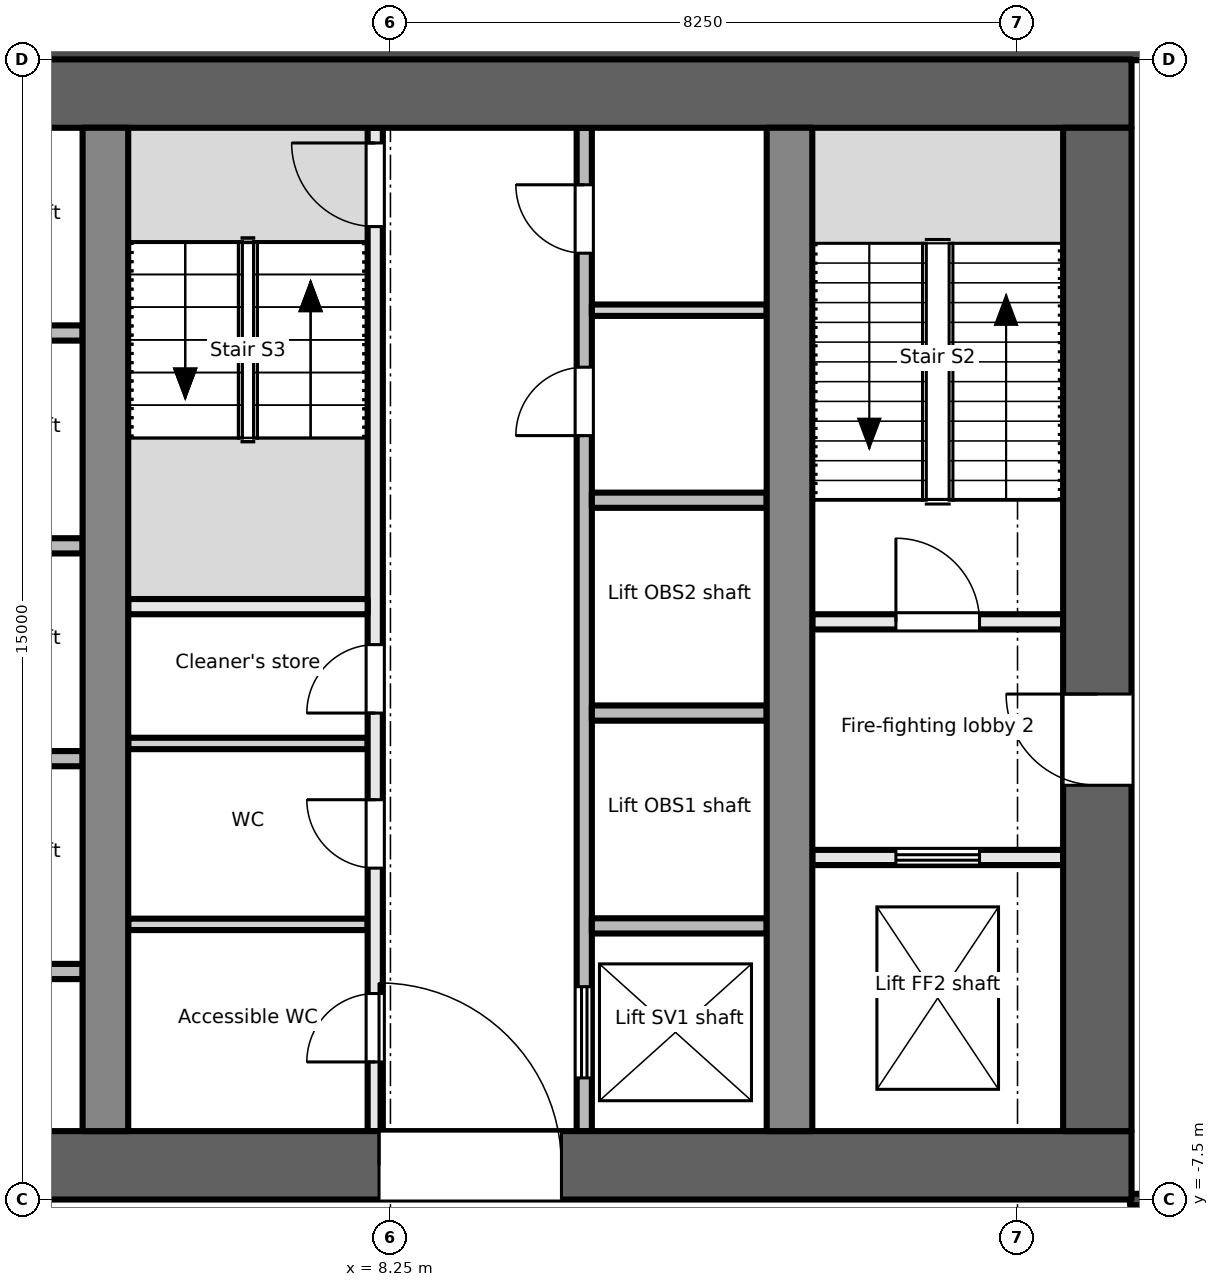
"""IFC4 building model, lengths in metres.
Left out: names, types, materials, properties, quantities, classifications, styles, units other than length and angle.
Written with IfcOpenShell. Run it as: python <this file> out.ifc"""

import sys

from ifc_helpers import new_model, si_unit, direction, frame, frame_2d, origin, place, context, subcontext, project, spatial, rectangle, extrude, element, fill, save


model = new_model("IFC4")
c1 = context("Model", 3, precision=1e-05, world=origin(), true_north=direction((0.0, 1.0)))
c2 = subcontext(c1, "Body", "Model", "MODEL_VIEW")
j1 = project(units=[si_unit("LENGTHUNIT", "METRE"), si_unit("PLANEANGLEUNIT", "RADIAN")], contexts=[c1])
p1 = place(None, origin())
s1 = spatial("IfcSite", under=j1, at=p1, CompositionType="ELEMENT")
p2 = place(p1, origin())
s2 = spatial("IfcBuilding", under=s1, at=p2, CompositionType="ELEMENT")
p3 = place(p2, frame((0.0, 0.0, 69.3)))
s3 = spatial("IfcBuildingStorey", under=s2, at=p3, CompositionType="ELEMENT", Elevation=69.3)
p4 = place(p3, frame((-18.0, -7.05, -0.2), z_axis=(0.0, 0.0, 1.0), x_axis=(1.0, 0.0, 0.0)))
e1 = element("IfcWall", 1, at=p4, inside=s3, PredefinedType="SHEAR", context=c2, shape_type="SweptSolid", body=[
    extrude(rectangle(XDim=36.0, YDim=0.9, at=frame_2d((18.0, 0.0))), origin(), (0.0, 0.0, 1.0), 5.0),
])
p5 = place(p4, frame((7.8, 0.0, 0.2)))
e2 = element("IfcOpeningElement", 2, at=p5, cuts=e1, PredefinedType="OPENING", context=c2, shape_type="SweptSolid", body=[
    extrude(rectangle(XDim=2.4, YDim=2.1, at=frame_2d((1.2, 1.05))), frame((0.0, 0.46, 0.0), z_axis=(0.0, -1.0, 0.0), x_axis=(1.0, 0.0, 0.0)), (0.0, 0.0, 1.0), 0.921),
])
p6 = place(p4, frame((17.4, 0.0, 0.2)))
e3 = element("IfcOpeningElement", 3, at=p6, cuts=e1, PredefinedType="OPENING", context=c2, shape_type="SweptSolid", body=[
    extrude(rectangle(XDim=1.2, YDim=2.1, at=frame_2d((0.6, 1.05))), frame((0.0, 0.46, 0.0), z_axis=(0.0, -1.0, 0.0), x_axis=(1.0, 0.0, 0.0)), (0.0, 0.0, 1.0), 0.921),
])
p7 = place(p4, frame((26.1, 0.0, 0.2)))
e4 = element("IfcOpeningElement", 4, at=p7, cuts=e1, PredefinedType="OPENING", context=c2, shape_type="SweptSolid", body=[
    extrude(rectangle(XDim=2.4, YDim=2.1, at=frame_2d((1.2, 1.05))), frame((0.0, 0.46, 0.0), z_axis=(0.0, -1.0, 0.0), x_axis=(1.0, 0.0, 0.0)), (0.0, 0.0, 1.0), 0.921),
])
p8 = place(p3, frame((-18.0, 7.05, -0.2), z_axis=(0.0, 0.0, 1.0), x_axis=(1.0, 0.0, 0.0)))
e5 = element("IfcWall", 5, at=p8, inside=s3, PredefinedType="SHEAR", context=c2, shape_type="SweptSolid", body=[
    extrude(rectangle(XDim=36.0, YDim=0.9, at=frame_2d((18.0, 0.0))), origin(), (0.0, 0.0, 1.0), 5.0),
])
p9 = place(p3, frame((17.55, -6.6, -0.2), z_axis=(0.0, 0.0, 1.0), x_axis=(0.0, 1.0, 0.0)))
e6 = element("IfcWall", 6, at=p9, inside=s3, PredefinedType="SHEAR", context=c2, shape_type="SweptSolid", body=[
    extrude(rectangle(XDim=13.2, YDim=0.9, at=frame_2d((6.6, 0.0))), origin(), (0.0, 0.0, 1.0), 5.0),
])
p10 = place(p9, frame((4.55, 0.0, 0.2)))
e7 = element("IfcOpeningElement", 7, at=p10, cuts=e6, PredefinedType="OPENING", context=c2, shape_type="SweptSolid", body=[
    extrude(rectangle(XDim=1.2, YDim=2.1, at=frame_2d((0.6, 1.05))), frame((0.0, 0.46, 0.0), z_axis=(0.0, -1.0, 0.0), x_axis=(1.0, 0.0, 0.0)), (0.0, 0.0, 1.0), 0.921),
])
for number, where, z_axis, x_axis in (
    (8, (4.5, -6.6, -0.2), (0.0, 0.0, 1.0), (0.0, 1.0, 0.0)),
    (9, (13.5, -6.6, -0.2), (0.0, 0.0, 1.0), (0.0, 1.0, 0.0)),
):
    element("IfcWall", number, at=place(p3, frame(where, z_axis=z_axis, x_axis=x_axis)), inside=s3, PredefinedType="SHEAR", context=c2, shape_type="SweptSolid", body=[
        extrude(rectangle(XDim=13.2, YDim=0.6, at=frame_2d((6.6, 0.0))), origin(), (0.0, 0.0, 1.0), 5.0),
    ])
p11 = place(p3, frame((13.8, -3.0, 0.0), z_axis=(0.0, 0.0, 1.0), x_axis=(1.0, 0.0, 0.0)))
e10 = element("IfcWall", 10, at=p11, inside=s3, PredefinedType="PARTITIONING", context=c2, shape_type="SweptSolid", body=[
    extrude(rectangle(XDim=3.3, YDim=0.2, at=frame_2d((1.65, 0.0))), origin(), (0.0, 0.0, 1.0), 4.8),
])
p12 = place(p11, frame((1.1, 0.0, 0.0)))
e11 = element("IfcOpeningElement", 11, at=p12, cuts=e10, PredefinedType="OPENING", context=c2, shape_type="SweptSolid", body=[
    extrude(rectangle(XDim=1.1, YDim=2.1, at=frame_2d((0.55, 1.05))), frame((0.0, 0.111, 0.0), z_axis=(0.0, -1.0, 0.0), x_axis=(1.0, 0.0, 0.0)), (0.0, 0.0, 1.0), 0.221),
])
p13 = place(p3, frame((13.8, 0.1, 0.0), z_axis=(0.0, 0.0, 1.0), x_axis=(1.0, 0.0, 0.0)))
e12 = element("IfcWall", 12, at=p13, inside=s3, PredefinedType="PARTITIONING", context=c2, shape_type="SweptSolid", body=[
    extrude(rectangle(XDim=3.3, YDim=0.2, at=frame_2d((1.65, 0.0))), origin(), (0.0, 0.0, 1.0), 4.8),
])
p14 = place(p13, frame((1.1, 0.0, 0.0)))
e13 = element("IfcOpeningElement", 13, at=p14, cuts=e12, PredefinedType="OPENING", context=c2, shape_type="SweptSolid", body=[
    extrude(rectangle(XDim=1.1, YDim=2.1, at=frame_2d((0.55, 1.05))), frame((0.0, 0.111, 0.0), z_axis=(0.0, -1.0, 0.0), x_axis=(1.0, 0.0, 0.0)), (0.0, 0.0, 1.0), 0.221),
])
for number, where, z_axis, x_axis in (
    (14, (1.9, -1.7, 0.0), (0.0, 0.0, 1.0), (1.0, 0.0, 0.0)),
    (15, (1.9, 1.1, 0.0), (0.0, 0.0, 1.0), (1.0, 0.0, 0.0)),
    (16, (1.9, 3.9, 0.0), (0.0, 0.0, 1.0), (1.0, 0.0, 0.0)),
    (17, (1.9, -4.5, 0.0), (0.0, 0.0, 1.0), (1.0, 0.0, 0.0)),
):
    element("IfcWall", number, at=place(p3, frame(where, z_axis=z_axis, x_axis=x_axis)), inside=s3, PredefinedType="PARTITIONING", context=c2, shape_type="SweptSolid", body=[
        extrude(rectangle(XDim=2.3, YDim=0.2, at=frame_2d((1.15, 0.0))), origin(), (0.0, 0.0, 1.0), 4.8),
    ])
p15 = place(p3, frame((8.05, -6.6, 0.0), z_axis=(0.0, 0.0, 1.0), x_axis=(0.0, 1.0, 0.0)))
e18 = element("IfcWall", 18, at=p15, inside=s3, PredefinedType="PARTITIONING", context=c2, shape_type="SweptSolid", body=[
    extrude(rectangle(XDim=13.2, YDim=0.2, at=frame_2d((6.6, 0.0))), origin(), (0.0, 0.0, 1.0), 4.8),
])
p16 = place(p15, frame((0.91, 0.0, 0.0)))
e19 = element("IfcOpeningElement", 19, at=p16, cuts=e18, PredefinedType="OPENING", context=c2, shape_type="SweptSolid", body=[
    extrude(rectangle(XDim=0.9, YDim=2.1, at=frame_2d((0.45, 1.05))), frame((0.0, 0.111, 0.0), z_axis=(0.0, -1.0, 0.0), x_axis=(1.0, 0.0, 0.0)), (0.0, 0.0, 1.0), 0.221),
])
p17 = place(p15, frame((3.46, 0.0, 0.0)))
e20 = element("IfcOpeningElement", 20, at=p17, cuts=e18, PredefinedType="OPENING", context=c2, shape_type="SweptSolid", body=[
    extrude(rectangle(XDim=0.9, YDim=2.1, at=frame_2d((0.45, 1.05))), frame((0.0, 0.111, 0.0), z_axis=(0.0, -1.0, 0.0), x_axis=(1.0, 0.0, 0.0)), (0.0, 0.0, 1.0), 0.221),
])
p18 = place(p15, frame((5.5, 0.0, 0.0)))
e21 = element("IfcOpeningElement", 21, at=p18, cuts=e18, PredefinedType="OPENING", context=c2, shape_type="SweptSolid", body=[
    extrude(rectangle(XDim=0.9, YDim=2.1, at=frame_2d((0.45, 1.05))), frame((0.0, 0.111, 0.0), z_axis=(0.0, -1.0, 0.0), x_axis=(1.0, 0.0, 0.0)), (0.0, 0.0, 1.0), 0.221),
])
p19 = place(p15, frame((11.9, 0.0, 0.0)))
e22 = element("IfcOpeningElement", 22, at=p19, cuts=e18, PredefinedType="OPENING", context=c2, shape_type="SweptSolid", body=[
    extrude(rectangle(XDim=1.1, YDim=2.1, at=frame_2d((0.55, 1.05))), frame((0.0, 0.111, 0.0), z_axis=(0.0, -1.0, 0.0), x_axis=(1.0, 0.0, 0.0)), (0.0, 0.0, 1.0), 0.221),
])
p20 = place(p3, frame((10.8, -6.6, 0.0), z_axis=(0.0, 0.0, 1.0), x_axis=(0.0, 1.0, 0.0)))
e23 = element("IfcWall", 23, at=p20, inside=s3, PredefinedType="PARTITIONING", context=c2, shape_type="SweptSolid", body=[
    extrude(rectangle(XDim=13.2, YDim=0.2, at=frame_2d((6.6, 0.0))), origin(), (0.0, 0.0, 1.0), 4.8),
])
p21 = place(p20, frame((0.7, 0.0, 0.0)))
e24 = element("IfcOpeningElement", 24, at=p21, cuts=e23, PredefinedType="OPENING", context=c2, shape_type="SweptSolid", body=[
    extrude(rectangle(XDim=1.2, YDim=2.1, at=frame_2d((0.6, 1.05))), frame((0.0, 0.111, 0.0), z_axis=(0.0, -1.0, 0.0), x_axis=(1.0, 0.0, 0.0)), (0.0, 0.0, 1.0), 0.221),
])
p22 = place(p20, frame((9.15, 0.0, 0.0)))
e25 = element("IfcOpeningElement", 25, at=p22, cuts=e23, PredefinedType="OPENING", context=c2, shape_type="SweptSolid", body=[
    extrude(rectangle(XDim=0.9, YDim=2.1, at=frame_2d((0.45, 1.05))), frame((0.0, 0.111, 0.0), z_axis=(0.0, -1.0, 0.0), x_axis=(1.0, 0.0, 0.0)), (0.0, 0.0, 1.0), 0.221),
])
p23 = place(p20, frame((11.55, 0.0, 0.0)))
e26 = element("IfcOpeningElement", 26, at=p23, cuts=e23, PredefinedType="OPENING", context=c2, shape_type="SweptSolid", body=[
    extrude(rectangle(XDim=0.9, YDim=2.1, at=frame_2d((0.45, 1.05))), frame((0.0, 0.111, 0.0), z_axis=(0.0, -1.0, 0.0), x_axis=(1.0, 0.0, 0.0)), (0.0, 0.0, 1.0), 0.221),
])
p24 = place(p3, frame((4.8, 0.3, 0.0), z_axis=(0.0, 0.0, 1.0), x_axis=(1.0, 0.0, 0.0)))
e27 = element("IfcWall", 27, at=p24, inside=s3, PredefinedType="PARTITIONING", context=c2, shape_type="SweptSolid", body=[
    extrude(rectangle(XDim=3.15, YDim=0.2, at=frame_2d((1.575, 0.0))), origin(), (0.0, 0.0, 1.0), 4.8),
])
for number, where, z_axis, x_axis in (
    (28, (4.8, -3.88, 0.0), (0.0, 0.0, 1.0), (1.0, 0.0, 0.0)),
    (29, (4.8, -1.5, 0.0), (0.0, 0.0, 1.0), (1.0, 0.0, 0.0)),
):
    element("IfcWall", number, at=place(p3, frame(where, z_axis=z_axis, x_axis=x_axis)), inside=s3, PredefinedType="PARTITIONING", context=c2, shape_type="SweptSolid", body=[
        extrude(rectangle(XDim=3.15, YDim=0.15, at=frame_2d((1.575, 0.0))), origin(), (0.0, 0.0, 1.0), 4.8),
    ])
for number, where, z_axis, x_axis in (
    (30, (10.9, -3.9, 0.0), (0.0, 0.0, 1.0), (1.0, 0.0, 0.0)),
    (31, (10.9, -1.1, 0.0), (0.0, 0.0, 1.0), (1.0, 0.0, 0.0)),
    (32, (10.9, 1.7, 0.0), (0.0, 0.0, 1.0), (1.0, 0.0, 0.0)),
):
    element("IfcWall", number, at=place(p3, frame(where, z_axis=z_axis, x_axis=x_axis)), inside=s3, PredefinedType="PARTITIONING", context=c2, shape_type="SweptSolid", body=[
        extrude(rectangle(XDim=2.3, YDim=0.2, at=frame_2d((1.15, 0.0))), origin(), (0.0, 0.0, 1.0), 4.8),
    ])
p25 = place(p3, frame((10.9, 4.2, 0.0), z_axis=(0.0, 0.0, 1.0), x_axis=(1.0, 0.0, 0.0)))
e33 = element("IfcWall", 33, at=p25, inside=s3, PredefinedType="PARTITIONING", context=c2, shape_type="SweptSolid", body=[
    extrude(rectangle(XDim=2.3, YDim=0.15, at=frame_2d((1.15, 0.0))), origin(), (0.0, 0.0, 1.0), 4.8),
])
p26 = place(p3, frame((17.98, -7.5, 0.0), z_axis=(0.0, 0.0, 1.0), x_axis=(1.0, 0.0, 0.0)))
e34 = element("IfcWall", 34, at=p26, inside=s3, PredefinedType="PARTITIONING", context=c2, shape_type="SweptSolid", body=[
    extrude(rectangle(XDim=2.32, YDim=0.15, at=frame_2d((1.16, 0.0))), origin(), (0.0, 0.0, 1.0), 2.15),
])
p27 = place(p26, frame((0.66, 0.0, 0.0)))
e35 = element("IfcOpeningElement", 35, at=p27, cuts=e34, PredefinedType="OPENING", context=c2, shape_type="SweptSolid", body=[
    extrude(rectangle(XDim=1.0, YDim=2.1, at=frame_2d((0.5, 1.05))), frame((0.0, 0.085, 0.0), z_axis=(0.0, -1.0, 0.0), x_axis=(1.0, 0.0, 0.0)), (0.0, 0.0, 1.0), 0.171),
])
p28 = place(p3, frame((-17.82, 7.564, 0.0), z_axis=(0.0, 0.0, 1.0), x_axis=(1.0, 0.0, 0.0)))
e36 = element("IfcWall", 36, at=p28, inside=s3, PredefinedType="PARTITIONING", context=c2, shape_type="SweptSolid", body=[
    extrude(rectangle(XDim=38.12, YDim=0.15, at=frame_2d((19.06, 0.0))), origin(), (0.0, 0.0, 1.0), 2.75),
])
p29 = place(p12, origin())
e37 = element("IfcDoor", 37, at=p29, inside=s3, OperationType="DOUBLE_DOOR_SLIDING", PredefinedType="DOOR", context=c2, shape_type="SweptSolid", body=[
    extrude(rectangle(XDim=1.1, YDim=2.1, at=frame_2d((0.55, 1.05))), frame((0.0, 0.025, 0.0), z_axis=(0.0, -1.0, 0.0), x_axis=(1.0, 0.0, 0.0)), (0.0, 0.0, 1.0), 0.05),
])
fill(e11, e37)
p30 = place(p10, origin())
e38 = element("IfcDoor", 38, at=p30, inside=s3, OperationType="SINGLE_SWING_RIGHT", PredefinedType="DOOR", context=c2, shape_type="SweptSolid", body=[
    extrude(rectangle(XDim=1.2, YDim=2.1, at=frame_2d((0.6, 1.05))), frame((0.0, 0.025, 0.0), z_axis=(0.0, -1.0, 0.0), x_axis=(1.0, 0.0, 0.0)), (0.0, 0.0, 1.0), 0.05),
])
fill(e7, e38)
p31 = place(p14, origin())
e39 = element("IfcDoor", 39, at=p31, inside=s3, OperationType="SINGLE_SWING_LEFT", PredefinedType="DOOR", context=c2, shape_type="SweptSolid", body=[
    extrude(rectangle(XDim=1.1, YDim=2.1, at=frame_2d((0.55, 1.05))), frame((0.0, 0.025, 0.0), z_axis=(0.0, -1.0, 0.0), x_axis=(1.0, 0.0, 0.0)), (0.0, 0.0, 1.0), 0.05),
])
fill(e13, e39)
p32 = place(p16, origin())
e40 = element("IfcDoor", 40, at=p32, inside=s3, OperationType="SINGLE_SWING_LEFT", PredefinedType="DOOR", context=c2, shape_type="SweptSolid", body=[
    extrude(rectangle(XDim=0.9, YDim=2.1, at=frame_2d((0.45, 1.05))), frame((0.0, 0.025, 0.0), z_axis=(0.0, -1.0, 0.0), x_axis=(1.0, 0.0, 0.0)), (0.0, 0.0, 1.0), 0.05),
])
fill(e19, e40)
p33 = place(p17, origin())
e41 = element("IfcDoor", 41, at=p33, inside=s3, OperationType="SINGLE_SWING_RIGHT", PredefinedType="DOOR", context=c2, shape_type="SweptSolid", body=[
    extrude(rectangle(XDim=0.9, YDim=2.1, at=frame_2d((0.45, 1.05))), frame((0.0, 0.025, 0.0), z_axis=(0.0, -1.0, 0.0), x_axis=(1.0, 0.0, 0.0)), (0.0, 0.0, 1.0), 0.05),
])
fill(e20, e41)
p34 = place(p18, origin())
e42 = element("IfcDoor", 42, at=p34, inside=s3, OperationType="SINGLE_SWING_LEFT", PredefinedType="DOOR", context=c2, shape_type="SweptSolid", body=[
    extrude(rectangle(XDim=0.9, YDim=2.1, at=frame_2d((0.45, 1.05))), frame((0.0, 0.025, 0.0), z_axis=(0.0, -1.0, 0.0), x_axis=(1.0, 0.0, 0.0)), (0.0, 0.0, 1.0), 0.05),
])
fill(e21, e42)
p35 = place(p19, origin())
e43 = element("IfcDoor", 43, at=p35, inside=s3, OperationType="SINGLE_SWING_RIGHT", PredefinedType="DOOR", context=c2, shape_type="SweptSolid", body=[
    extrude(rectangle(XDim=1.1, YDim=2.1, at=frame_2d((0.55, 1.05))), frame((0.0, 0.025, 0.0), z_axis=(0.0, -1.0, 0.0), x_axis=(1.0, 0.0, 0.0)), (0.0, 0.0, 1.0), 0.05),
])
fill(e22, e43)
p36 = place(p7, origin())
e44 = element("IfcDoor", 44, at=p36, inside=s3, OperationType="DOUBLE_DOOR_DOUBLE_SWING", PredefinedType="DOOR", context=c2, shape_type="SweptSolid", body=[
    extrude(rectangle(XDim=2.4, YDim=2.1, at=frame_2d((1.2, 1.05))), frame((0.0, 0.025, 0.0), z_axis=(0.0, -1.0, 0.0), x_axis=(1.0, 0.0, 0.0)), (0.0, 0.0, 1.0), 0.05),
])
fill(e4, e44)
p37 = place(p21, origin())
e45 = element("IfcDoor", 45, at=p37, inside=s3, OperationType="DOUBLE_DOOR_SLIDING", PredefinedType="DOOR", context=c2, shape_type="SweptSolid", body=[
    extrude(rectangle(XDim=1.2, YDim=2.1, at=frame_2d((0.6, 1.05))), frame((0.0, 0.025, 0.0), z_axis=(0.0, -1.0, 0.0), x_axis=(1.0, 0.0, 0.0)), (0.0, 0.0, 1.0), 0.05),
])
fill(e24, e45)
p38 = place(p22, origin())
e46 = element("IfcDoor", 46, at=p38, inside=s3, OperationType="SINGLE_SWING_LEFT", PredefinedType="DOOR", context=c2, shape_type="SweptSolid", body=[
    extrude(rectangle(XDim=0.9, YDim=2.1, at=frame_2d((0.45, 1.05))), frame((0.0, 0.025, 0.0), z_axis=(0.0, -1.0, 0.0), x_axis=(1.0, 0.0, 0.0)), (0.0, 0.0, 1.0), 0.05),
])
fill(e25, e46)
p39 = place(p23, origin())
e47 = element("IfcDoor", 47, at=p39, inside=s3, OperationType="SINGLE_SWING_RIGHT", PredefinedType="DOOR", context=c2, shape_type="SweptSolid", body=[
    extrude(rectangle(XDim=0.9, YDim=2.1, at=frame_2d((0.45, 1.05))), frame((0.0, 0.025, 0.0), z_axis=(0.0, -1.0, 0.0), x_axis=(1.0, 0.0, 0.0)), (0.0, 0.0, 1.0), 0.05),
])
fill(e26, e47)
save(model, sys.argv[1])
